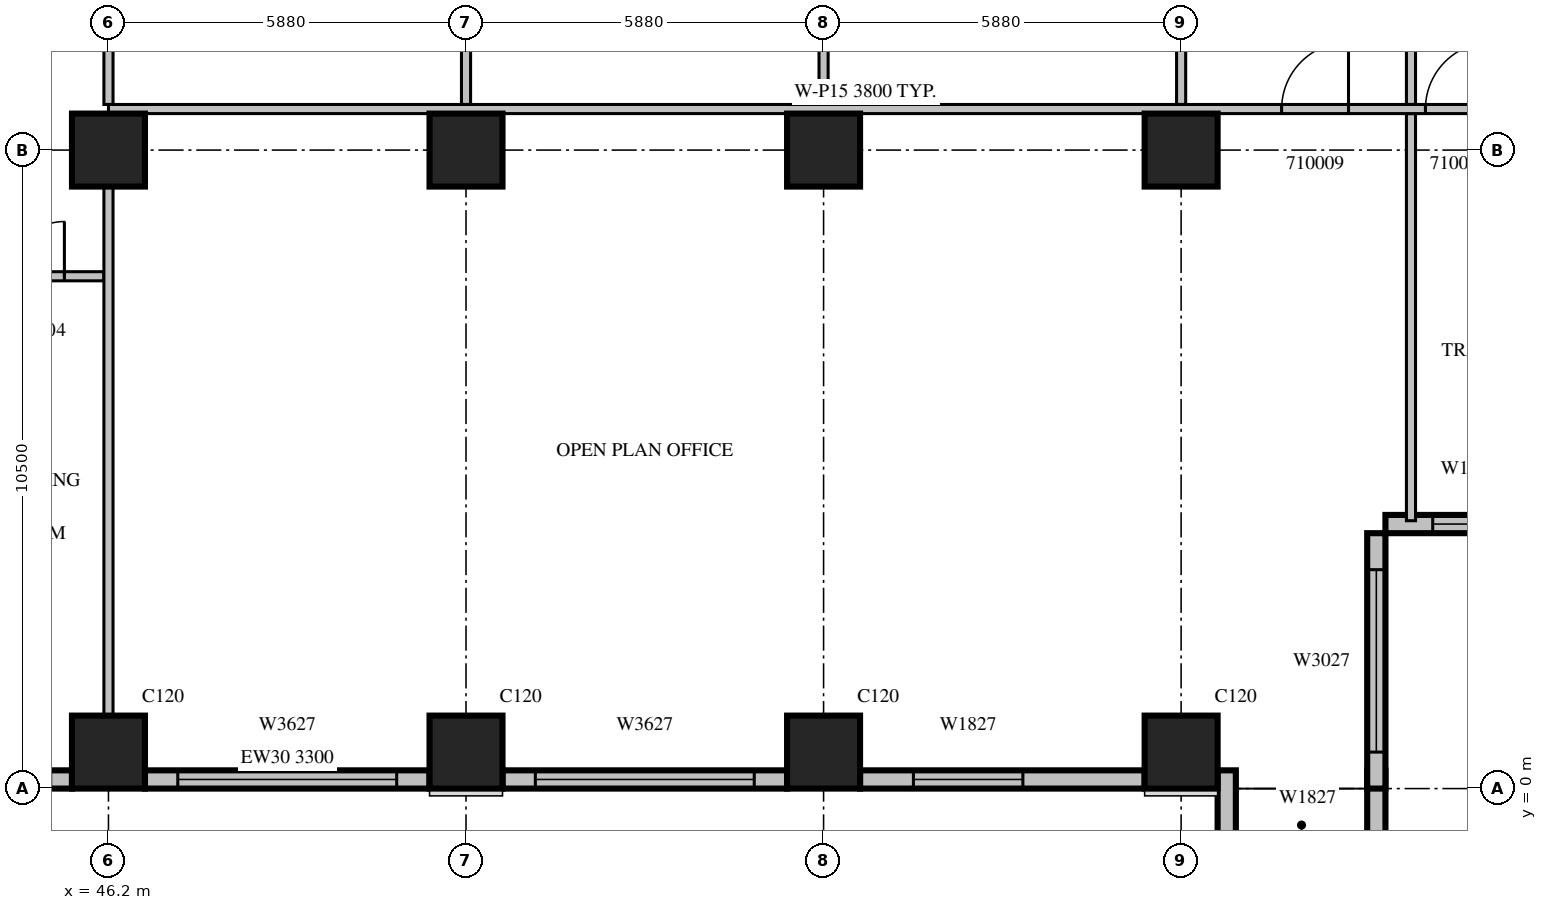
"""IFC4 building model, lengths in metres.
Left out: names, types, materials, properties, quantities, classifications, styles, units other than length and angle.
Written with IfcOpenShell. Run it as: python <this file> out.ifc"""

import sys

from ifc_helpers import new_model, si_unit, direction, frame, frame_2d, origin, origin_2d, place, context, subcontext, project, spatial, rectangle, extrude, source, transform, mapped, element, fill, save


model = new_model("IFC4")
c1 = context("Model", 3, precision=1e-05, world=origin(), true_north=direction((0.0, 1.0)))
c2 = subcontext(c1, "Body", "Model", "MODEL_VIEW")
j1 = project(units=[si_unit("LENGTHUNIT", "METRE"), si_unit("PLANEANGLEUNIT", "RADIAN")], contexts=[c1])
p1 = place(None, origin())
s1 = spatial("IfcSite", under=j1, at=p1, CompositionType="ELEMENT")
p2 = place(p1, origin())
s2 = spatial("IfcBuilding", under=s1, at=p2, CompositionType="ELEMENT")
p3 = place(p2, frame((0.0, 0.0, 53.1)))
s3 = spatial("IfcBuildingStorey", under=s2, at=p3, CompositionType="ELEMENT", Elevation=53.1)
m1 = source(origin(), c2, "Body", "SweptSolid", [
    extrude(rectangle(XDim=1.2, YDim=1.2, at=origin_2d()), origin(), (0.0, 0.0, 1.0), 4.2),
])
for number, where, z_axis, x_axis in (
    (1, (46.2, 0.6, 0.0), (0.0, 0.0, 1.0), (1.0, 0.0, 0.0)),
    (2, (52.08, 0.6, 0.0), (0.0, 0.0, 1.0), (1.0, 0.0, 0.0)),
    (3, (57.96, 0.6, 0.0), (0.0, 0.0, 1.0), (1.0, 0.0, 0.0)),
    (4, (63.84, 0.6, 0.0), (0.0, 0.0, 1.0), (1.0, 0.0, 0.0)),
    (5, (46.2, 10.5, 0.0), (0.0, 0.0, 1.0), (1.0, 0.0, 0.0)),
    (6, (52.08, 10.5, 0.0), (0.0, 0.0, 1.0), (1.0, 0.0, 0.0)),
    (7, (57.96, 10.5, 0.0), (0.0, 0.0, 1.0), (1.0, 0.0, 0.0)),
    (8, (63.84, 10.5, 0.0), (0.0, 0.0, 1.0), (1.0, 0.0, 0.0)),
):
    element("IfcColumn", number, at=place(p3, frame(where, z_axis=z_axis, x_axis=x_axis)), inside=s3, PredefinedType="COLUMN", context=c2, shape_type="MappedRepresentation", body=[
        mapped(m1, transform((0.0, 0.0, 0.0), scale=1.0)),
    ])
m2 = source(origin(), c2, "Body", "SweptSolid", [
    extrude(rectangle(XDim=1.6, YDim=0.3, at=frame_2d((0.8, 0.0))), origin(), (0.0, 0.0, 1.0), 3.8),
])
p4 = place(p3, frame((44.0, 0.15, 0.0), z_axis=(0.0, 0.0, 1.0), x_axis=(1.0, 0.0, 0.0)))
e9 = element("IfcWall", 9, at=p4, inside=s3, PredefinedType="STANDARD", context=c2, shape_type="MappedRepresentation", body=[
    mapped(m2, transform((0.0, 0.0, 0.0), scale=1.0)),
])
m3 = source(origin(), c2, "Body", "SweptSolid", [
    extrude(rectangle(XDim=0.9, YDim=2.7, at=frame_2d((0.45, 1.35))), frame((0.0, 0.16, 0.0), z_axis=(0.0, -1.0, 0.0), x_axis=(1.0, 0.0, 0.0)), (0.0, 0.0, 1.0), 0.32),
])
p5 = place(p4, frame((0.35, 0.0, 0.6)))
e10 = element("IfcOpeningElement", 10, at=p5, cuts=e9, PredefinedType="OPENING", context=c2, shape_type="MappedRepresentation", body=[
    mapped(m3, transform((0.0, 0.0, 0.0), scale=1.0)),
])
m4 = source(origin(), c2, "Body", "SweptSolid", [
    extrude(rectangle(XDim=4.68, YDim=0.3, at=frame_2d((2.34, 0.0))), origin(), (0.0, 0.0, 1.0), 3.3),
])
p6 = place(p3, frame((46.8, 0.15, 0.0), z_axis=(0.0, 0.0, 1.0), x_axis=(1.0, 0.0, 0.0)))
e11 = element("IfcWall", 11, at=p6, inside=s3, PredefinedType="STANDARD", context=c2, shape_type="MappedRepresentation", body=[
    mapped(m4, transform((0.0, 0.0, 0.0), scale=1.0)),
])
m5 = source(origin(), c2, "Body", "SweptSolid", [
    extrude(rectangle(XDim=3.6, YDim=2.7, at=frame_2d((1.8, 1.35))), frame((0.0, 0.16, 0.0), z_axis=(0.0, -1.0, 0.0), x_axis=(1.0, 0.0, 0.0)), (0.0, 0.0, 1.0), 0.32),
])
p7 = place(p6, frame((0.54, 0.0, 0.6)))
e12 = element("IfcOpeningElement", 12, at=p7, cuts=e11, PredefinedType="OPENING", context=c2, shape_type="MappedRepresentation", body=[
    mapped(m5, transform((0.0, 0.0, 0.0), scale=1.0)),
])
m6 = source(origin(), c2, "Body", "SweptSolid", [
    extrude(rectangle(XDim=4.68, YDim=0.3, at=frame_2d((2.34, 0.0))), origin(), (0.0, 0.0, 1.0), 3.8),
])
p8 = place(p3, frame((52.68, 0.15, 0.0), z_axis=(0.0, 0.0, 1.0), x_axis=(1.0, 0.0, 0.0)))
e13 = element("IfcWall", 13, at=p8, inside=s3, PredefinedType="STANDARD", context=c2, shape_type="MappedRepresentation", body=[
    mapped(m6, transform((0.0, 0.0, 0.0), scale=1.0)),
])
p9 = place(p8, frame((0.54, 0.0, 0.6)))
e14 = element("IfcOpeningElement", 14, at=p9, cuts=e13, PredefinedType="OPENING", context=c2, shape_type="MappedRepresentation", body=[
    mapped(m5, transform((0.0, 0.0, 0.0), scale=1.0)),
])
p10 = place(p3, frame((58.56, 0.15, 0.0), z_axis=(0.0, 0.0, 1.0), x_axis=(1.0, 0.0, 0.0)))
e15 = element("IfcWall", 15, at=p10, inside=s3, PredefinedType="STANDARD", context=c2, shape_type="MappedRepresentation", body=[
    mapped(m6, transform((0.0, 0.0, 0.0), scale=1.0)),
])
m7 = source(origin(), c2, "Body", "SweptSolid", [
    extrude(rectangle(XDim=1.8, YDim=2.7, at=frame_2d((0.9, 1.35))), frame((0.0, 0.16, 0.0), z_axis=(0.0, -1.0, 0.0), x_axis=(1.0, 0.0, 0.0)), (0.0, 0.0, 1.0), 0.32),
])
p11 = place(p10, frame((0.877, 0.0, 0.6)))
e16 = element("IfcOpeningElement", 16, at=p11, cuts=e15, PredefinedType="OPENING", context=c2, shape_type="MappedRepresentation", body=[
    mapped(m7, transform((0.0, 0.0, 0.0), scale=1.0)),
])
m8 = source(origin(), c2, "Body", "SweptSolid", [
    extrude(rectangle(XDim=1.2, YDim=0.3, at=frame_2d((0.6, 0.0))), origin(), (0.0, 0.0, 1.0), 3.8),
])
for number, where, z_axis, x_axis in (
    (17, (64.59, 0.3, 0.0), (0.0, 0.0, 1.0), (0.0, -1.0, 0.0)),
    (18, (67.05, 0.3, 0.0), (0.0, 0.0, 1.0), (0.0, -1.0, 0.0)),
):
    element("IfcWall", number, at=place(p3, frame(where, z_axis=z_axis, x_axis=x_axis)), inside=s3, PredefinedType="STANDARD", context=c2, shape_type="MappedRepresentation", body=[
        mapped(m8, transform((0.0, 0.0, 0.0), scale=1.0)),
    ])
m9 = source(origin(), c2, "Body", "SweptSolid", [
    extrude(rectangle(XDim=4.2, YDim=0.3, at=frame_2d((2.1, 0.0))), origin(), (0.0, 0.0, 1.0), 3.8),
])
p12 = place(p3, frame((67.05, 0.0, 0.0), z_axis=(0.0, 0.0, 1.0), x_axis=(0.0, 1.0, 0.0)))
e19 = element("IfcWall", 19, at=p12, inside=s3, PredefinedType="STANDARD", context=c2, shape_type="MappedRepresentation", body=[
    mapped(m9, transform((0.0, 0.0, 0.0), scale=1.0)),
])
m10 = source(origin(), c2, "Body", "SweptSolid", [
    extrude(rectangle(XDim=3.0, YDim=2.7, at=frame_2d((1.5, 1.35))), frame((0.0, 0.16, 0.0), z_axis=(0.0, -1.0, 0.0), x_axis=(1.0, 0.0, 0.0)), (0.0, 0.0, 1.0), 0.32),
])
p13 = place(p12, frame((0.6, 0.0, 0.6)))
e20 = element("IfcOpeningElement", 20, at=p13, cuts=e19, PredefinedType="OPENING", context=c2, shape_type="MappedRepresentation", body=[
    mapped(m10, transform((0.0, 0.0, 0.0), scale=1.0)),
])
m11 = source(origin(), c2, "Body", "SweptSolid", [
    extrude(rectangle(XDim=2.52, YDim=0.3, at=frame_2d((1.26, 0.0))), origin(), (0.0, 0.0, 1.0), 3.8),
])
p14 = place(p3, frame((67.2, 4.35, 0.0), z_axis=(0.0, 0.0, 1.0), x_axis=(1.0, 0.0, 0.0)))
e21 = element("IfcWall", 21, at=p14, inside=s3, PredefinedType="STANDARD", context=c2, shape_type="MappedRepresentation", body=[
    mapped(m11, transform((0.0, 0.0, 0.0), scale=1.0)),
])
m12 = source(origin(), c2, "Body", "SweptSolid", [
    extrude(rectangle(XDim=1.2, YDim=2.7, at=frame_2d((0.6, 1.35))), frame((0.0, 0.16, 0.0), z_axis=(0.0, -1.0, 0.0), x_axis=(1.0, 0.0, 0.0)), (0.0, 0.0, 1.0), 0.32),
])
p15 = place(p14, frame((0.777, 0.0, 0.6)))
e22 = element("IfcOpeningElement", 22, at=p15, cuts=e21, PredefinedType="OPENING", context=c2, shape_type="MappedRepresentation", body=[
    mapped(m12, transform((0.0, 0.0, 0.0), scale=1.0)),
])
m13 = source(origin(), c2, "Body", "SweptSolid", [
    extrude(rectangle(XDim=2.2, YDim=0.15, at=frame_2d((1.1, 0.0))), origin(), (0.0, 0.0, 1.0), 3.8),
])
p16 = place(p3, frame((46.125, 8.425, 0.0), z_axis=(0.0, 0.0, 1.0), x_axis=(-1.0, 0.0, 0.0)))
e23 = element("IfcWall", 23, at=p16, inside=s3, PredefinedType="PARTITIONING", context=c2, shape_type="MappedRepresentation", body=[
    mapped(m13, transform((0.0, 0.0, 0.0), scale=1.0)),
])
m14 = source(origin(), c2, "Body", "SweptSolid", [
    extrude(rectangle(XDim=0.9, YDim=2.1, at=frame_2d((0.45, 1.05))), frame((0.0, 0.085, 0.0), z_axis=(0.0, -1.0, 0.0), x_axis=(1.0, 0.0, 0.0)), (0.0, 0.0, 1.0), 0.17),
])
p17 = place(p16, frame((0.65, 0.0, 0.0)))
e24 = element("IfcOpeningElement", 24, at=p17, cuts=e23, PredefinedType="OPENING", context=c2, shape_type="MappedRepresentation", body=[
    mapped(m14, transform((0.0, 0.0, 0.0), scale=1.0)),
])
m15 = source(origin(), c2, "Body", "SweptSolid", [
    extrude(rectangle(XDim=3.75, YDim=0.15, at=frame_2d((1.875, 0.0))), origin(), (0.0, 0.0, 1.0), 3.8),
])
for number, where, z_axis, x_axis in (
    (25, (52.08, 11.25, 0.0), (0.0, 0.0, 1.0), (0.0, 1.0, 0.0)),
    (26, (57.96, 11.25, 0.0), (0.0, 0.0, 1.0), (0.0, 1.0, 0.0)),
    (27, (63.84, 11.25, 0.0), (0.0, 0.0, 1.0), (0.0, 1.0, 0.0)),
):
    element("IfcWall", number, at=place(p3, frame(where, z_axis=z_axis, x_axis=x_axis)), inside=s3, PredefinedType="PARTITIONING", context=c2, shape_type="MappedRepresentation", body=[
        mapped(m15, transform((0.0, 0.0, 0.0), scale=1.0)),
    ])
m16 = source(origin(), c2, "Body", "SweptSolid", [
    extrude(rectangle(XDim=8.702, YDim=0.15, at=frame_2d((4.351, 0.0))), origin(), (0.0, 0.0, 1.0), 3.8),
])
p18 = place(p3, frame((46.2, 1.199, 0.0), z_axis=(0.0, 0.0, 1.0), x_axis=(0.0, 1.0, 0.0)))
e28 = element("IfcWall", 28, at=p18, inside=s3, PredefinedType="PARTITIONING", context=c2, shape_type="MappedRepresentation", body=[
    mapped(m16, transform((0.0, 0.0, 0.0), scale=1.0)),
])
p19 = place(p3, frame((46.2, 11.25, 0.0), z_axis=(0.0, 0.0, 1.0), x_axis=(0.0, 1.0, 0.0)))
e29 = element("IfcWall", 29, at=p19, inside=s3, PredefinedType="PARTITIONING", context=c2, shape_type="MappedRepresentation", body=[
    mapped(m15, transform((0.0, 0.0, 0.0), scale=1.0)),
])
m17 = source(origin(), c2, "Body", "SweptSolid", [
    extrude(rectangle(XDim=6.695, YDim=0.15, at=frame_2d((3.348, 0.0))), origin(), (0.0, 0.0, 1.0), 3.8),
])
p20 = place(p3, frame((67.62, 4.405, 0.0), z_axis=(0.0, 0.0, 1.0), x_axis=(0.0, 1.0, 0.0)))
e30 = element("IfcWall", 30, at=p20, inside=s3, PredefinedType="PARTITIONING", context=c2, shape_type="MappedRepresentation", body=[
    mapped(m17, transform((0.0, 0.0, 0.0), scale=1.0)),
])
p21 = place(p3, frame((67.62, 11.25, 0.0), z_axis=(0.0, 0.0, 1.0), x_axis=(0.0, 1.0, 0.0)))
e31 = element("IfcWall", 31, at=p21, inside=s3, PredefinedType="PARTITIONING", context=c2, shape_type="MappedRepresentation", body=[
    mapped(m15, transform((0.0, 0.0, 0.0), scale=1.0)),
])
m18 = source(origin(), c2, "Body", "SweptSolid", [
    extrude(rectangle(XDim=24.9, YDim=0.15, at=frame_2d((12.45, 0.0))), origin(), (0.0, 0.0, 1.0), 3.8),
])
p22 = place(p3, frame((71.1, 11.175, 0.0), z_axis=(0.0, 0.0, 1.0), x_axis=(-1.0, 0.0, 0.0)))
e32 = element("IfcWall", 32, at=p22, inside=s3, PredefinedType="PARTITIONING", context=c2, shape_type="MappedRepresentation", body=[
    mapped(m18, transform((0.0, 0.0, 0.0), scale=1.0)),
])
m19 = source(origin(), c2, "Body", "SweptSolid", [
    extrude(rectangle(XDim=1.1, YDim=2.1, at=frame_2d((0.55, 1.05))), frame((0.0, 0.085, 0.0), z_axis=(0.0, -1.0, 0.0), x_axis=(1.0, 0.0, 0.0)), (0.0, 0.0, 1.0), 0.17),
])
p23 = place(p22, frame((4.508, 0.0, 0.0)))
e33 = element("IfcOpeningElement", 33, at=p23, cuts=e32, PredefinedType="OPENING", context=c2, shape_type="MappedRepresentation", body=[
    mapped(m19, transform((0.0, 0.0, 0.0), scale=1.0)),
])
p24 = place(p22, frame((2.143, 0.0, 0.0)))
e34 = element("IfcOpeningElement", 34, at=p24, cuts=e32, PredefinedType="OPENING", context=c2, shape_type="MappedRepresentation", body=[
    mapped(m19, transform((0.0, 0.0, 0.0), scale=1.0)),
])
m20 = source(origin(), c2, "Body", "SweptSolid", [
    extrude(rectangle(XDim=3.6, YDim=2.7, at=frame_2d((1.8, 1.35))), frame((0.0, 0.03, 0.0), z_axis=(0.0, -1.0, 0.0), x_axis=(1.0, 0.0, 0.0)), (0.0, 0.0, 1.0), 0.06),
])
p25 = place(p7, origin())
e35 = element("IfcWindow", 35, at=p25, inside=s3, PartitioningType="SINGLE_PANEL", PredefinedType="WINDOW", context=c2, shape_type="MappedRepresentation", body=[
    mapped(m20, transform((0.0, 0.0, 0.0), scale=1.0)),
])
fill(e12, e35)
p26 = place(p9, origin())
e36 = element("IfcWindow", 36, at=p26, inside=s3, PartitioningType="SINGLE_PANEL", PredefinedType="WINDOW", context=c2, shape_type="MappedRepresentation", body=[
    mapped(m20, transform((0.0, 0.0, 0.0), scale=1.0)),
])
fill(e14, e36)
m21 = source(origin(), c2, "Body", "SweptSolid", [
    extrude(rectangle(XDim=1.8, YDim=2.7, at=frame_2d((0.9, 1.35))), frame((0.0, 0.03, 0.0), z_axis=(0.0, -1.0, 0.0), x_axis=(1.0, 0.0, 0.0)), (0.0, 0.0, 1.0), 0.06),
])
p27 = place(p11, origin())
e37 = element("IfcWindow", 37, at=p27, inside=s3, PartitioningType="SINGLE_PANEL", PredefinedType="WINDOW", context=c2, shape_type="MappedRepresentation", body=[
    mapped(m21, transform((0.0, 0.0, 0.0), scale=1.0)),
])
fill(e16, e37)
m22 = source(origin(), c2, "Body", "SweptSolid", [
    extrude(rectangle(XDim=3.0, YDim=2.7, at=frame_2d((1.5, 1.35))), frame((0.0, 0.03, 0.0), z_axis=(0.0, -1.0, 0.0), x_axis=(1.0, 0.0, 0.0)), (0.0, 0.0, 1.0), 0.06),
])
p28 = place(p13, origin())
e38 = element("IfcWindow", 38, at=p28, inside=s3, PartitioningType="SINGLE_PANEL", PredefinedType="WINDOW", context=c2, shape_type="MappedRepresentation", body=[
    mapped(m22, transform((0.0, 0.0, 0.0), scale=1.0)),
])
fill(e20, e38)
m23 = source(origin(), c2, "Body", "SweptSolid", [
    extrude(rectangle(XDim=1.2, YDim=2.7, at=frame_2d((0.6, 1.35))), frame((0.0, 0.03, 0.0), z_axis=(0.0, -1.0, 0.0), x_axis=(1.0, 0.0, 0.0)), (0.0, 0.0, 1.0), 0.06),
])
p29 = place(p15, origin())
e39 = element("IfcWindow", 39, at=p29, inside=s3, PartitioningType="SINGLE_PANEL", PredefinedType="WINDOW", context=c2, shape_type="MappedRepresentation", body=[
    mapped(m23, transform((0.0, 0.0, 0.0), scale=1.0)),
])
fill(e22, e39)
m24 = source(origin(), c2, "Body", "SweptSolid", [
    extrude(rectangle(XDim=0.9, YDim=2.1, at=frame_2d((0.45, 1.05))), frame((0.0, 0.025, 0.0), z_axis=(0.0, -1.0, 0.0), x_axis=(1.0, 0.0, 0.0)), (0.0, 0.0, 1.0), 0.05),
])
p30 = place(p17, origin())
e40 = element("IfcDoor", 40, at=p30, inside=s3, OperationType="SINGLE_SWING_RIGHT", PredefinedType="DOOR", context=c2, shape_type="MappedRepresentation", body=[
    mapped(m24, transform((0.0, 0.0, 0.0), scale=1.0)),
])
fill(e24, e40)
m25 = source(origin(), c2, "Body", "SweptSolid", [
    extrude(rectangle(XDim=1.1, YDim=2.1, at=frame_2d((0.55, 1.05))), frame((0.0, 0.025, 0.0), z_axis=(0.0, -1.0, 0.0), x_axis=(1.0, 0.0, 0.0)), (0.0, 0.0, 1.0), 0.05),
])
p31 = place(p23, origin())
e41 = element("IfcDoor", 41, at=p31, inside=s3, OperationType="SINGLE_SWING_RIGHT", PredefinedType="DOOR", context=c2, shape_type="MappedRepresentation", body=[
    mapped(m25, transform((0.0, 0.0, 0.0), scale=1.0)),
])
fill(e33, e41)
p32 = place(p24, origin())
e42 = element("IfcDoor", 42, at=p32, inside=s3, OperationType="SINGLE_SWING_RIGHT", PredefinedType="DOOR", context=c2, shape_type="MappedRepresentation", body=[
    mapped(m25, transform((0.0, 0.0, 0.0), scale=1.0)),
])
fill(e34, e42)
save(model, sys.argv[1])
